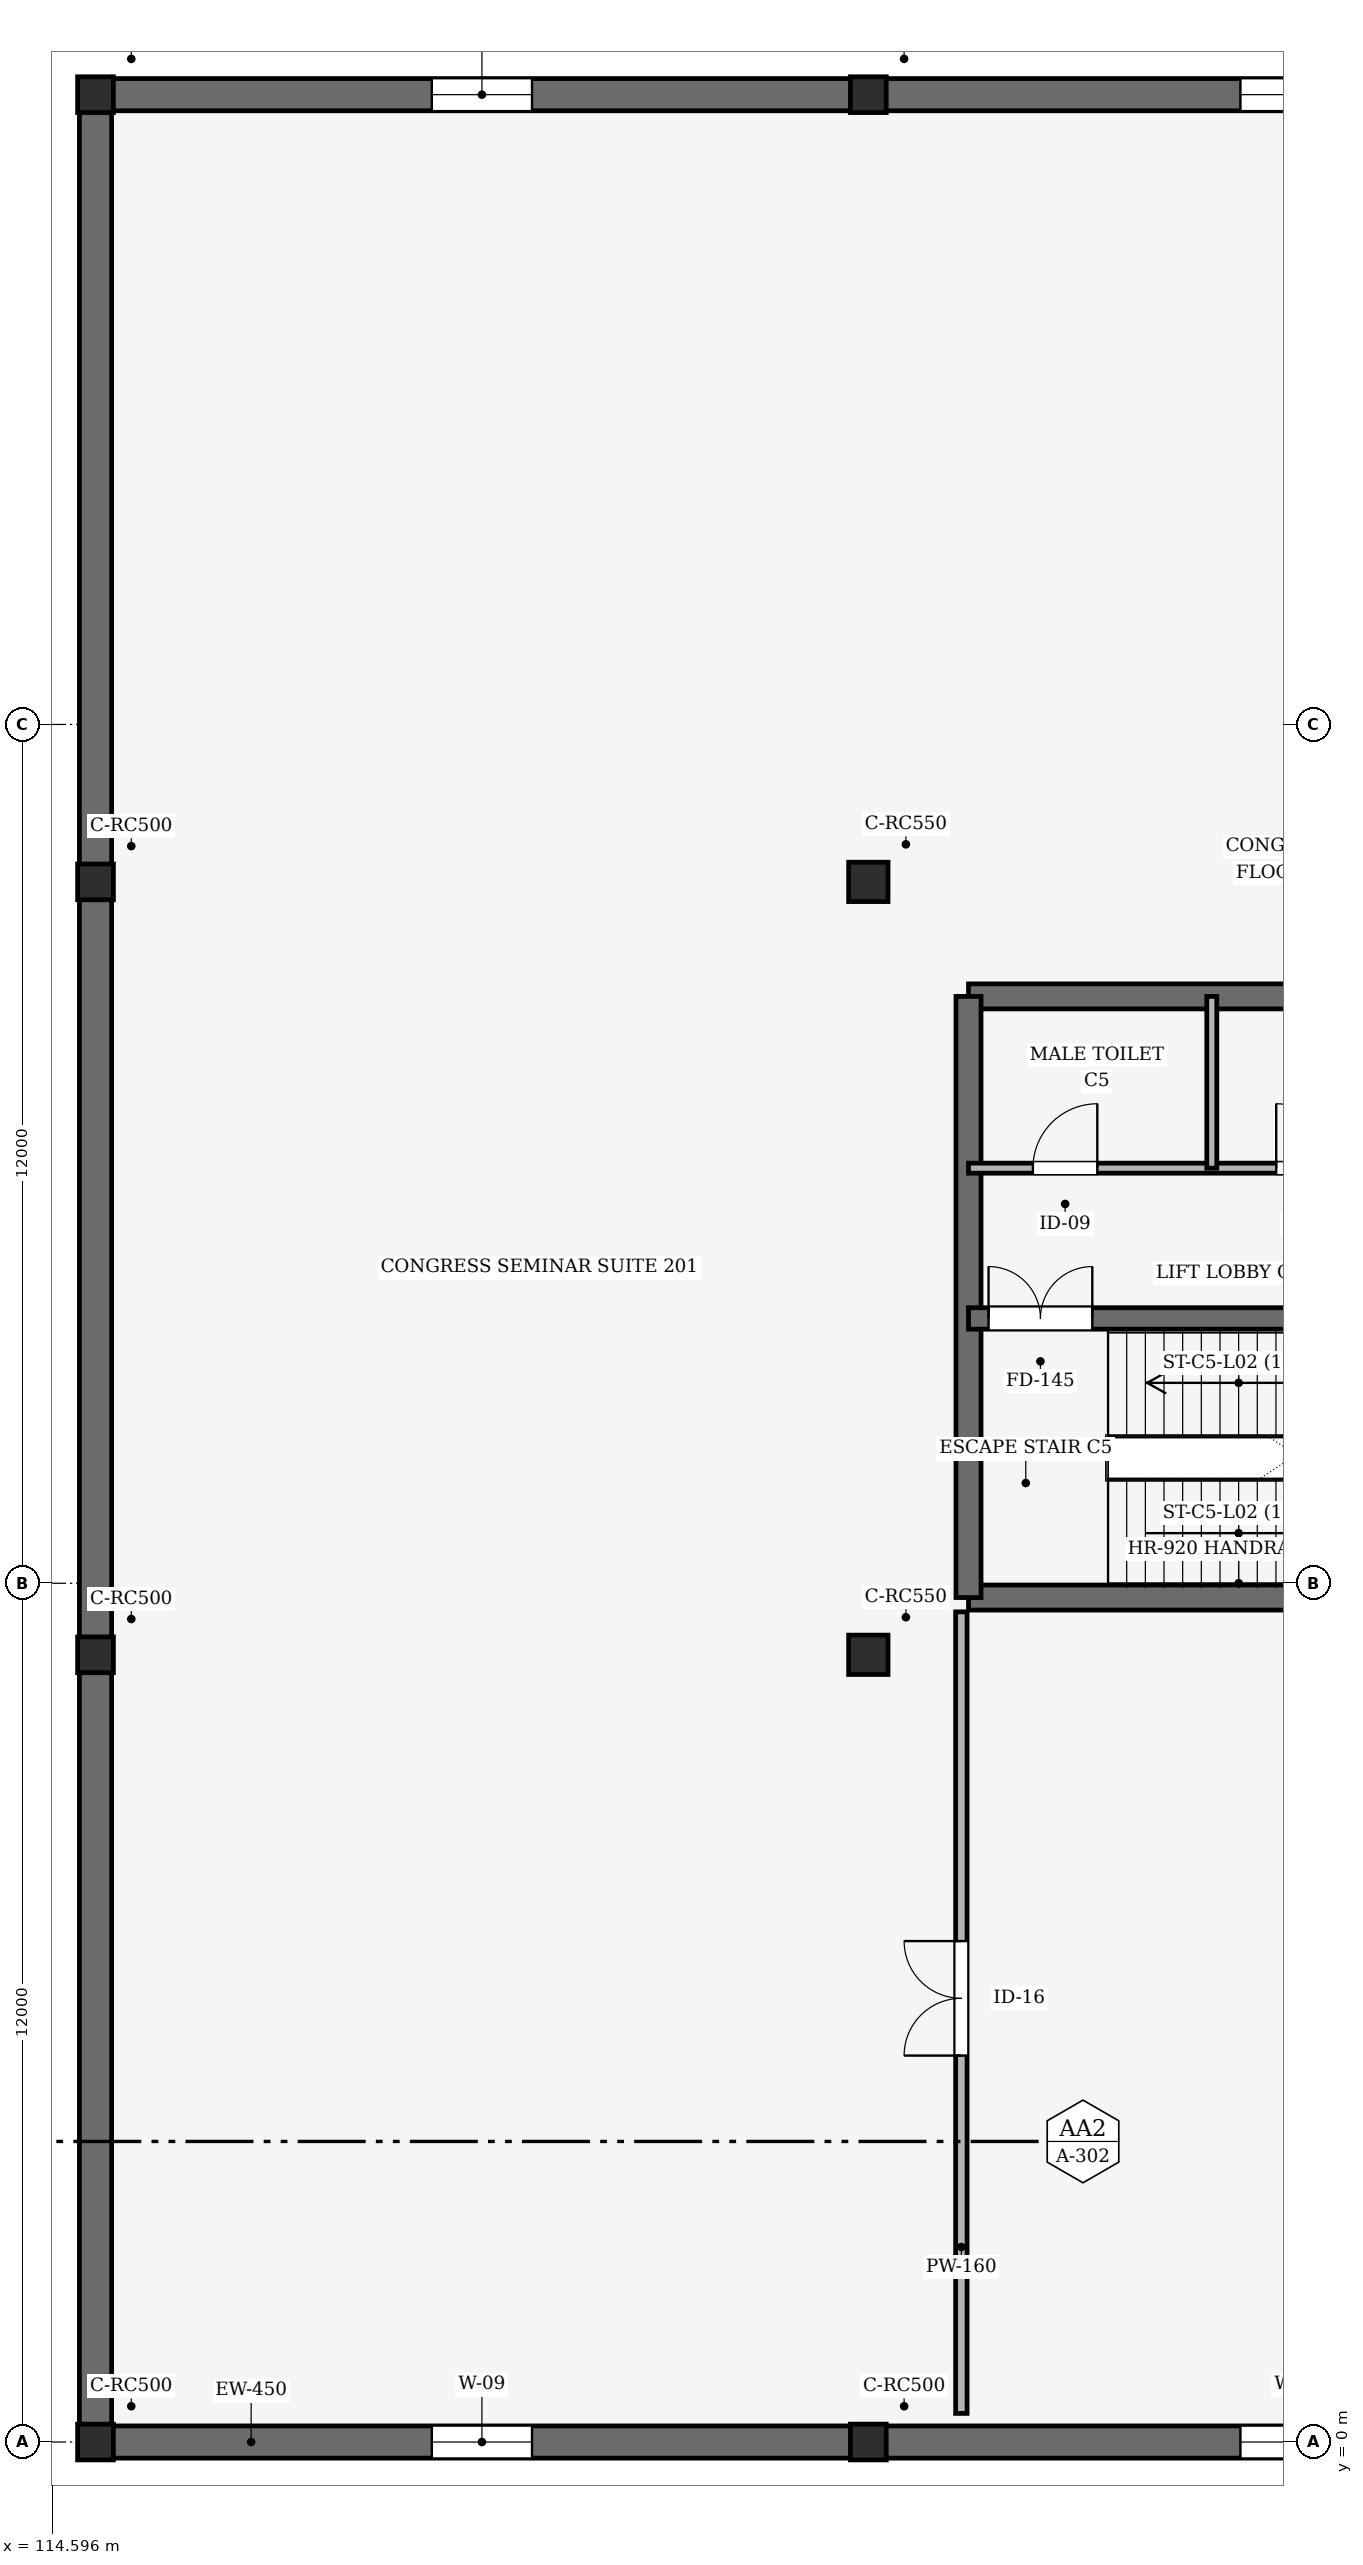
"""IFC4 building model, lengths in metres.
Left out: names, types, materials, properties, quantities, classifications, styles, units other than length and angle.
Written with IfcOpenShell. Run it as: python <this file> out.ifc"""

import sys

from ifc_helpers import new_model, si_unit, direction, frame, frame_2d, origin, origin_2d, place, context, subcontext, project, spatial, rectangle, extrude, element, fill, save


model = new_model("IFC4")
c1 = context("Model", 3, precision=1e-05, world=origin(), true_north=direction((0.0, 1.0)))
c2 = subcontext(c1, "Body", "Model", "MODEL_VIEW")
j1 = project(units=[si_unit("LENGTHUNIT", "METRE"), si_unit("PLANEANGLEUNIT", "RADIAN")], contexts=[c1])
p1 = place(None, origin())
s1 = spatial("IfcSite", under=j1, at=p1, CompositionType="ELEMENT")
p2 = place(p1, origin())
s2 = spatial("IfcBuilding", under=s1, at=p2, CompositionType="ELEMENT")
p3 = place(p2, frame((0.0, 0.0, 10.8)))
s3 = spatial("IfcBuildingStorey", under=s2, at=p3, CompositionType="ELEMENT", Elevation=10.8)
for number, where, z_axis, x_axis in (
    (1, (115.2, 0.0, 0.0), (0.0, 0.0, 1.0), (1.0, 0.0, 0.0)),
    (2, (115.2, 11.0, 0.0), (0.0, 0.0, 1.0), (1.0, 0.0, 0.0)),
    (3, (115.2, 21.8, 0.0), (0.0, 0.0, 1.0), (1.0, 0.0, 0.0)),
    (4, (115.2, 32.8, 0.0), (0.0, 0.0, 1.0), (1.0, 0.0, 0.0)),
    (5, (126.0, 0.0, 0.0), (0.0, 0.0, 1.0), (1.0, 0.0, 0.0)),
):
    element("IfcColumn", number, at=place(p3, frame(where, z_axis=z_axis, x_axis=x_axis)), inside=s3, PredefinedType="COLUMN", context=c2, shape_type="SweptSolid", body=[
        extrude(rectangle(XDim=0.5, YDim=0.5, at=origin_2d()), origin(), (0.0, 0.0, 1.0), 5.4),
    ])
for number, where, z_axis, x_axis in (
    (6, (126.0, 11.0, 0.0), (0.0, 0.0, 1.0), (1.0, 0.0, 0.0)),
    (7, (126.0, 21.8, 0.0), (0.0, 0.0, 1.0), (1.0, 0.0, 0.0)),
):
    element("IfcColumn", number, at=place(p3, frame(where, z_axis=z_axis, x_axis=x_axis)), inside=s3, PredefinedType="COLUMN", context=c2, shape_type="SweptSolid", body=[
        extrude(rectangle(XDim=0.55, YDim=0.55, at=origin_2d()), origin(), (0.0, 0.0, 1.0), 5.4),
    ])
p4 = place(p3, frame((126.0, 32.8, 0.0), z_axis=(0.0, 0.0, 1.0), x_axis=(1.0, 0.0, 0.0)))
e8 = element("IfcColumn", 8, at=p4, inside=s3, PredefinedType="COLUMN", context=c2, shape_type="SweptSolid", body=[
    extrude(rectangle(XDim=0.5, YDim=0.5, at=origin_2d()), origin(), (0.0, 0.0, 1.0), 5.4),
])
p5 = place(p3, frame((115.2, 0.0, 0.0), z_axis=(0.0, 0.0, 1.0), x_axis=(1.0, 0.0, 0.0)))
e9 = element("IfcWall", 9, at=p5, inside=s3, PredefinedType="SOLIDWALL", context=c2, shape_type="SweptSolid", body=[
    extrude(rectangle(XDim=10.8, YDim=0.45, at=frame_2d((5.4, 0.0))), origin(), (0.0, 0.0, 1.0), 4.35),
])
p6 = place(p5, frame((4.7, 0.0, 0.9)))
e10 = element("IfcOpeningElement", 10, at=p6, cuts=e9, PredefinedType="OPENING", context=c2, shape_type="SweptSolid", body=[
    extrude(rectangle(XDim=1.4, YDim=2.0, at=frame_2d((0.7, 1.0))), frame((0.0, 0.235, 0.0), z_axis=(0.0, -1.0, 0.0), x_axis=(1.0, 0.0, 0.0)), (0.0, 0.0, 1.0), 0.47),
])
p7 = place(p3, frame((126.0, 32.8, 0.0), z_axis=(0.0, 0.0, 1.0), x_axis=(-1.0, 0.0, 0.0)))
e11 = element("IfcWall", 11, at=p7, inside=s3, PredefinedType="SOLIDWALL", context=c2, shape_type="SweptSolid", body=[
    extrude(rectangle(XDim=10.8, YDim=0.45, at=frame_2d((5.4, 0.0))), origin(), (0.0, 0.0, 1.0), 4.35),
])
p8 = place(p7, frame((4.7, 0.0, 0.9)))
e12 = element("IfcOpeningElement", 12, at=p8, cuts=e11, PredefinedType="OPENING", context=c2, shape_type="SweptSolid", body=[
    extrude(rectangle(XDim=1.4, YDim=2.0, at=frame_2d((0.7, 1.0))), frame((0.0, 0.235, 0.0), z_axis=(0.0, -1.0, 0.0), x_axis=(1.0, 0.0, 0.0)), (0.0, 0.0, 1.0), 0.47),
])
p9 = place(p3, frame((126.0, 0.0, 0.0), z_axis=(0.0, 0.0, 1.0), x_axis=(1.0, 0.0, 0.0)))
e13 = element("IfcWall", 13, at=p9, inside=s3, PredefinedType="SOLIDWALL", context=c2, shape_type="SweptSolid", body=[
    extrude(rectangle(XDim=12.0, YDim=0.45, at=frame_2d((6.0, 0.0))), origin(), (0.0, 0.0, 1.0), 4.35),
])
p10 = place(p9, frame((5.2, 0.0, 0.9)))
e14 = element("IfcOpeningElement", 14, at=p10, cuts=e13, PredefinedType="OPENING", context=c2, shape_type="SweptSolid", body=[
    extrude(rectangle(XDim=1.6, YDim=2.35, at=frame_2d((0.8, 1.175))), frame((0.0, 0.235, 0.0), z_axis=(0.0, -1.0, 0.0), x_axis=(1.0, 0.0, 0.0)), (0.0, 0.0, 1.0), 0.47),
])
p11 = place(p3, frame((138.0, 32.8, 0.0), z_axis=(0.0, 0.0, 1.0), x_axis=(-1.0, 0.0, 0.0)))
e15 = element("IfcWall", 15, at=p11, inside=s3, PredefinedType="SOLIDWALL", context=c2, shape_type="SweptSolid", body=[
    extrude(rectangle(XDim=12.0, YDim=0.45, at=frame_2d((6.0, 0.0))), origin(), (0.0, 0.0, 1.0), 4.35),
])
p12 = place(p11, frame((5.2, 0.0, 0.9)))
e16 = element("IfcOpeningElement", 16, at=p12, cuts=e15, PredefinedType="OPENING", context=c2, shape_type="SweptSolid", body=[
    extrude(rectangle(XDim=1.6, YDim=2.35, at=frame_2d((0.8, 1.175))), frame((0.0, 0.235, 0.0), z_axis=(0.0, -1.0, 0.0), x_axis=(1.0, 0.0, 0.0)), (0.0, 0.0, 1.0), 0.47),
])
p13 = place(p3, frame((115.2, 11.0, 0.0), z_axis=(0.0, 0.0, 1.0), x_axis=(0.0, -1.0, 0.0)))
e17 = element("IfcWall", 17, at=p13, inside=s3, PredefinedType="SOLIDWALL", context=c2, shape_type="SweptSolid", body=[
    extrude(rectangle(XDim=11.0, YDim=0.45, at=frame_2d((5.5, 0.0))), origin(), (0.0, 0.0, 1.0), 4.35),
])
p14 = place(p3, frame((115.2, 21.8, 0.0), z_axis=(0.0, 0.0, 1.0), x_axis=(0.0, -1.0, 0.0)))
e18 = element("IfcWall", 18, at=p14, inside=s3, PredefinedType="SOLIDWALL", context=c2, shape_type="SweptSolid", body=[
    extrude(rectangle(XDim=10.8, YDim=0.45, at=frame_2d((5.4, 0.0))), origin(), (0.0, 0.0, 1.0), 4.35),
])
p15 = place(p3, frame((115.2, 32.8, 0.0), z_axis=(0.0, 0.0, 1.0), x_axis=(0.0, -1.0, 0.0)))
e19 = element("IfcWall", 19, at=p15, inside=s3, PredefinedType="SOLIDWALL", context=c2, shape_type="SweptSolid", body=[
    extrude(rectangle(XDim=11.0, YDim=0.45, at=frame_2d((5.5, 0.0))), origin(), (0.0, 0.0, 1.0), 4.35),
])
for number, where, z_axis, x_axis in (
    (20, (127.4, 11.8, 0.0), (0.0, 0.0, 1.0), (1.0, 0.0, 0.0)),
    (21, (137.6, 20.2, 0.0), (0.0, 0.0, 1.0), (-1.0, 0.0, 0.0)),
):
    element("IfcWall", number, at=place(p3, frame(where, z_axis=z_axis, x_axis=x_axis)), inside=s3, PredefinedType="SHEAR", context=c2, shape_type="SweptSolid", body=[
        extrude(rectangle(XDim=10.2, YDim=0.35, at=frame_2d((5.1, 0.0))), origin(), (0.0, 0.0, 1.0), 5.4),
    ])
p16 = place(p3, frame((127.4, 20.2, 0.0), z_axis=(0.0, 0.0, 1.0), x_axis=(0.0, -1.0, 0.0)))
e22 = element("IfcWall", 22, at=p16, inside=s3, PredefinedType="SHEAR", context=c2, shape_type="SweptSolid", body=[
    extrude(rectangle(XDim=8.4, YDim=0.35, at=frame_2d((4.2, 0.0))), origin(), (0.0, 0.0, 1.0), 5.4),
])
p17 = place(p3, frame((127.4, 15.7, 0.0), z_axis=(0.0, 0.0, 1.0), x_axis=(1.0, 0.0, 0.0)))
e23 = element("IfcWall", 23, at=p17, inside=s3, PredefinedType="SHEAR", context=c2, shape_type="SweptSolid", body=[
    extrude(rectangle(XDim=10.2, YDim=0.3, at=frame_2d((5.1, 0.0))), origin(), (0.0, 0.0, 1.0), 5.4),
])
p18 = place(p17, frame((0.28, 0.0, 0.0)))
e24 = element("IfcOpeningElement", 24, at=p18, cuts=e23, PredefinedType="OPENING", context=c2, shape_type="SweptSolid", body=[
    extrude(rectangle(XDim=1.45, YDim=2.15, at=frame_2d((0.725, 1.075))), frame((0.0, 0.16, 0.0), z_axis=(0.0, -1.0, 0.0), x_axis=(1.0, 0.0, 0.0)), (0.0, 0.0, 1.0), 0.32),
])
p19 = place(p17, frame((8.225, 0.0, 0.0)))
e25 = element("IfcOpeningElement", 25, at=p19, cuts=e23, PredefinedType="OPENING", context=c2, shape_type="SweptSolid", body=[
    extrude(rectangle(XDim=1.1, YDim=2.15, at=frame_2d((0.55, 1.075))), frame((0.0, 0.16, 0.0), z_axis=(0.0, -1.0, 0.0), x_axis=(1.0, 0.0, 0.0)), (0.0, 0.0, 1.0), 0.32),
])
p20 = place(p3, frame((127.4, 17.8, 0.0), z_axis=(0.0, 0.0, 1.0), x_axis=(1.0, 0.0, 0.0)))
e26 = element("IfcWall", 26, at=p20, inside=s3, PredefinedType="PARTITIONING", context=c2, shape_type="SweptSolid", body=[
    extrude(rectangle(XDim=10.2, YDim=0.14, at=frame_2d((5.1, 0.0))), origin(), (0.0, 0.0, 1.0), 4.5),
])
p21 = place(p20, frame((0.9, 0.0, 0.0)))
e27 = element("IfcOpeningElement", 27, at=p21, cuts=e26, PredefinedType="OPENING", context=c2, shape_type="SweptSolid", body=[
    extrude(rectangle(XDim=0.9, YDim=2.1, at=frame_2d((0.45, 1.05))), frame((0.0, 0.08, 0.0), z_axis=(0.0, -1.0, 0.0), x_axis=(1.0, 0.0, 0.0)), (0.0, 0.0, 1.0), 0.16),
])
p22 = place(p20, frame((4.3, 0.0, 0.0)))
e28 = element("IfcOpeningElement", 28, at=p22, cuts=e26, PredefinedType="OPENING", context=c2, shape_type="SweptSolid", body=[
    extrude(rectangle(XDim=0.9, YDim=2.1, at=frame_2d((0.45, 1.05))), frame((0.0, 0.08, 0.0), z_axis=(0.0, -1.0, 0.0), x_axis=(1.0, 0.0, 0.0)), (0.0, 0.0, 1.0), 0.16),
])
p23 = place(p20, frame((7.7, 0.0, 0.0)))
e29 = element("IfcOpeningElement", 29, at=p23, cuts=e26, PredefinedType="OPENING", context=c2, shape_type="SweptSolid", body=[
    extrude(rectangle(XDim=0.95, YDim=2.1, at=frame_2d((0.475, 1.05))), frame((0.0, 0.08, 0.0), z_axis=(0.0, -1.0, 0.0), x_axis=(1.0, 0.0, 0.0)), (0.0, 0.0, 1.0), 0.16),
])
p24 = place(p3, frame((130.8, 17.8, 0.0), z_axis=(0.0, 0.0, 1.0), x_axis=(0.0, 1.0, 0.0)))
e30 = element("IfcWall", 30, at=p24, inside=s3, PredefinedType="PARTITIONING", context=c2, shape_type="SweptSolid", body=[
    extrude(rectangle(XDim=2.4, YDim=0.14, at=frame_2d((1.2, 0.0))), origin(), (0.0, 0.0, 1.0), 4.5),
])
p25 = place(p3, frame((127.3, 0.4, 0.0), z_axis=(0.0, 0.0, 1.0), x_axis=(0.0, 1.0, 0.0)))
e31 = element("IfcWall", 31, at=p25, inside=s3, PredefinedType="PARTITIONING", context=c2, shape_type="SweptSolid", body=[
    extrude(rectangle(XDim=11.2, YDim=0.16, at=frame_2d((5.6, 0.0))), origin(), (0.0, 0.0, 1.0), 3.6),
])
p26 = place(p25, frame((5.0, 0.0, 0.0)))
e32 = element("IfcOpeningElement", 32, at=p26, cuts=e31, PredefinedType="OPENING", context=c2, shape_type="SweptSolid", body=[
    extrude(rectangle(XDim=1.6, YDim=2.2, at=frame_2d((0.8, 1.1))), frame((0.0, 0.09, 0.0), z_axis=(0.0, -1.0, 0.0), x_axis=(1.0, 0.0, 0.0)), (0.0, 0.0, 1.0), 0.18),
])
p27 = place(p6, origin())
e33 = element("IfcWindow", 33, at=p27, inside=s3, PartitioningType="DOUBLE_PANEL_VERTICAL", PredefinedType="WINDOW", context=c2, shape_type="SweptSolid", body=[
    extrude(rectangle(XDim=1.4, YDim=2.0, at=frame_2d((0.7, 1.0))), frame((0.0, 0.03, 0.0), z_axis=(0.0, -1.0, 0.0), x_axis=(1.0, 0.0, 0.0)), (0.0, 0.0, 1.0), 0.06),
])
fill(e10, e33)
p28 = place(p8, origin())
e34 = element("IfcWindow", 34, at=p28, inside=s3, PartitioningType="DOUBLE_PANEL_VERTICAL", PredefinedType="WINDOW", context=c2, shape_type="SweptSolid", body=[
    extrude(rectangle(XDim=1.4, YDim=2.0, at=frame_2d((0.7, 1.0))), frame((0.0, 0.03, 0.0), z_axis=(0.0, -1.0, 0.0), x_axis=(1.0, 0.0, 0.0)), (0.0, 0.0, 1.0), 0.06),
])
fill(e12, e34)
p29 = place(p10, origin())
e35 = element("IfcWindow", 35, at=p29, inside=s3, PartitioningType="DOUBLE_PANEL_VERTICAL", PredefinedType="WINDOW", context=c2, shape_type="SweptSolid", body=[
    extrude(rectangle(XDim=1.6, YDim=2.35, at=frame_2d((0.8, 1.175))), frame((0.0, 0.03, 0.0), z_axis=(0.0, -1.0, 0.0), x_axis=(1.0, 0.0, 0.0)), (0.0, 0.0, 1.0), 0.06),
])
fill(e14, e35)
p30 = place(p12, origin())
e36 = element("IfcWindow", 36, at=p30, inside=s3, PartitioningType="DOUBLE_PANEL_VERTICAL", PredefinedType="WINDOW", context=c2, shape_type="SweptSolid", body=[
    extrude(rectangle(XDim=1.6, YDim=2.35, at=frame_2d((0.8, 1.175))), frame((0.0, 0.03, 0.0), z_axis=(0.0, -1.0, 0.0), x_axis=(1.0, 0.0, 0.0)), (0.0, 0.0, 1.0), 0.06),
])
fill(e16, e36)
p31 = place(p18, origin())
e37 = element("IfcDoor", 37, at=p31, inside=s3, OperationType="DOUBLE_DOOR_SINGLE_SWING", PredefinedType="DOOR", context=c2, shape_type="SweptSolid", body=[
    extrude(rectangle(XDim=1.45, YDim=2.15, at=frame_2d((0.725, 1.075))), frame((0.0, 0.025, 0.0), z_axis=(0.0, -1.0, 0.0), x_axis=(1.0, 0.0, 0.0)), (0.0, 0.0, 1.0), 0.05),
])
fill(e24, e37)
p32 = place(p21, origin())
e38 = element("IfcDoor", 38, at=p32, inside=s3, OperationType="SINGLE_SWING_RIGHT", PredefinedType="DOOR", context=c2, shape_type="SweptSolid", body=[
    extrude(rectangle(XDim=0.9, YDim=2.1, at=frame_2d((0.45, 1.05))), frame((0.0, 0.025, 0.0), z_axis=(0.0, -1.0, 0.0), x_axis=(1.0, 0.0, 0.0)), (0.0, 0.0, 1.0), 0.05),
])
fill(e27, e38)
p33 = place(p22, origin())
e39 = element("IfcDoor", 39, at=p33, inside=s3, OperationType="SINGLE_SWING_LEFT", PredefinedType="DOOR", context=c2, shape_type="SweptSolid", body=[
    extrude(rectangle(XDim=0.9, YDim=2.1, at=frame_2d((0.45, 1.05))), frame((0.0, 0.025, 0.0), z_axis=(0.0, -1.0, 0.0), x_axis=(1.0, 0.0, 0.0)), (0.0, 0.0, 1.0), 0.05),
])
fill(e28, e39)
p34 = place(p26, origin())
e40 = element("IfcDoor", 40, at=p34, inside=s3, OperationType="DOUBLE_DOOR_SINGLE_SWING", PredefinedType="DOOR", context=c2, shape_type="SweptSolid", body=[
    extrude(rectangle(XDim=1.6, YDim=2.2, at=frame_2d((0.8, 1.1))), frame((0.0, 0.025, 0.0), z_axis=(0.0, -1.0, 0.0), x_axis=(1.0, 0.0, 0.0)), (0.0, 0.0, 1.0), 0.05),
])
fill(e32, e40)
save(model, sys.argv[1])
